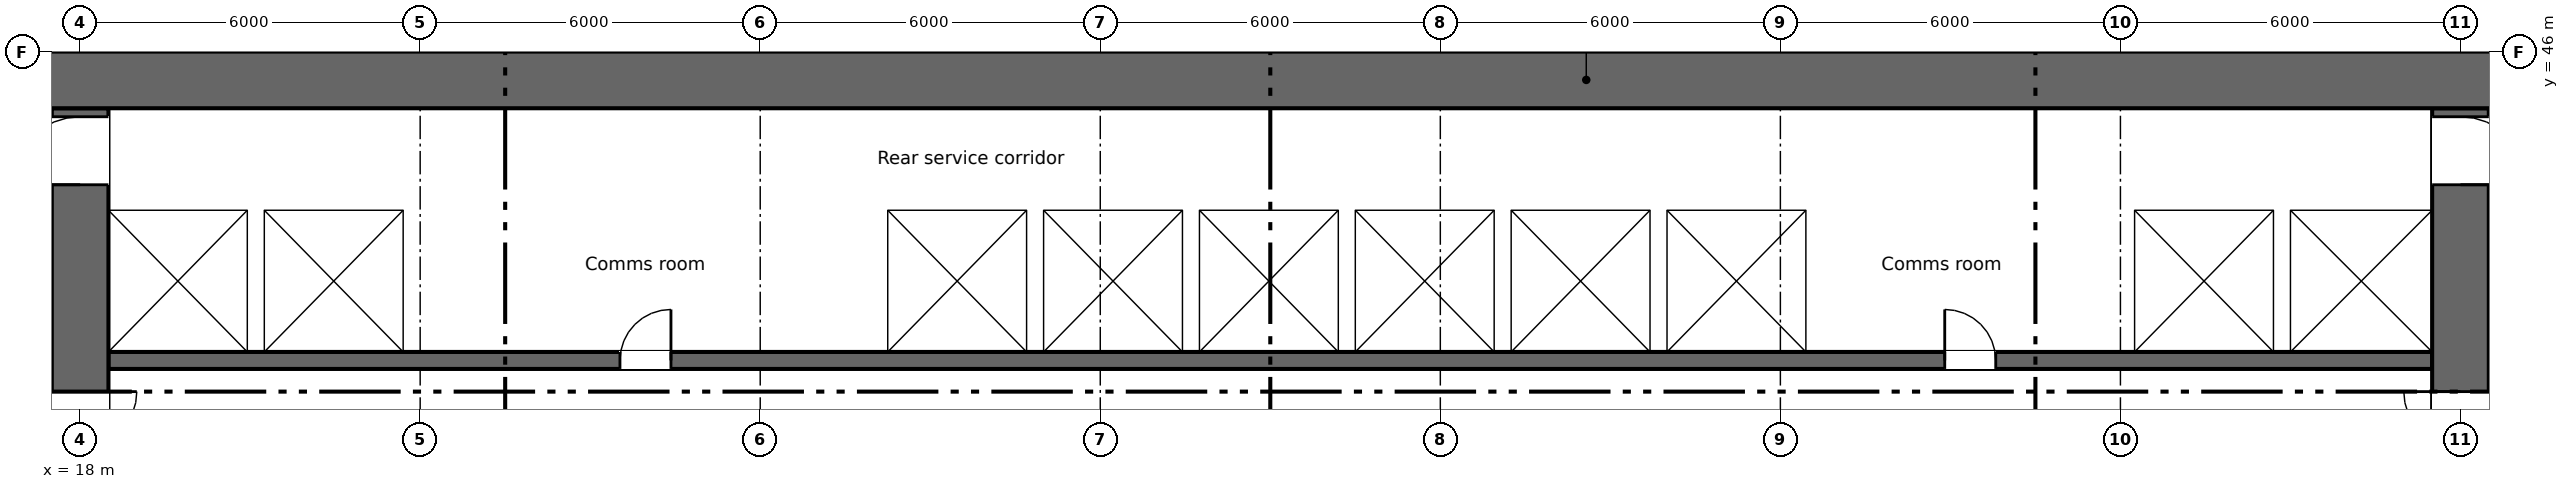
"""IFC4 building model, lengths in metres.
Left out: names, types, materials, properties, quantities, classifications, styles, units other than length and angle.
Written with IfcOpenShell. Run it as: python <this file> out.ifc"""

import sys

from ifc_helpers import new_model, si_unit, direction, frame, frame_2d, origin, place, context, subcontext, project, spatial, rectangle, extrude, element, fill, save


model = new_model("IFC4")
c1 = context("Model", 3, precision=1e-05, world=origin(), true_north=direction((0.0, 1.0)))
c2 = subcontext(c1, "Body", "Model", "MODEL_VIEW")
j1 = project(units=[si_unit("LENGTHUNIT", "METRE"), si_unit("PLANEANGLEUNIT", "RADIAN")], contexts=[c1])
p1 = place(None, origin())
s1 = spatial("IfcSite", under=j1, at=p1, CompositionType="ELEMENT")
p2 = place(p1, origin())
s2 = spatial("IfcBuilding", under=s1, at=p2, CompositionType="ELEMENT")
p3 = place(p2, frame((0.0, 0.0, 75.0)))
s3 = spatial("IfcBuildingStorey", under=s2, at=p3, CompositionType="ELEMENT", Elevation=75.0)
p4 = place(p3, frame((5.55, 45.5, 0.0), z_axis=(0.0, 0.0, 1.0), x_axis=(1.0, 0.0, 0.0)))
e1 = element("IfcWall", 1, at=p4, inside=s3, PredefinedType="SHEAR", context=c2, shape_type="SweptSolid", body=[
    extrude(rectangle(XDim=66.9, YDim=1.0, at=frame_2d((33.45, 0.0))), origin(), (0.0, 0.0, 1.0), 3.35),
])
p5 = place(p4, frame((7.2, 0.0, 0.6)))
e2 = element("IfcOpeningElement", 2, at=p5, cuts=e1, PredefinedType="OPENING", context=c2, shape_type="SweptSolid", body=[
    extrude(rectangle(XDim=0.6, YDim=2.4, at=frame_2d((0.3, 1.2))), frame((0.0, 0.51, 0.0), z_axis=(0.0, -1.0, 0.0), x_axis=(1.0, 0.0, 0.0)), (0.0, 0.0, 1.0), 1.02),
])
p6 = place(p4, frame((61.2, 0.0, 0.6)))
e3 = element("IfcOpeningElement", 3, at=p6, cuts=e1, PredefinedType="OPENING", context=c2, shape_type="SweptSolid", body=[
    extrude(rectangle(XDim=0.6, YDim=2.4, at=frame_2d((0.3, 1.2))), frame((0.0, 0.51, 0.0), z_axis=(0.0, -1.0, 0.0), x_axis=(1.0, 0.0, 0.0)), (0.0, 0.0, 1.0), 1.02),
])
p7 = place(p3, frame((18.0, 28.4, 0.0), z_axis=(0.0, 0.0, 1.0), x_axis=(0.0, 1.0, 0.0)))
e4 = element("IfcWall", 4, at=p7, inside=s3, PredefinedType="SHEAR", context=c2, shape_type="SweptSolid", body=[
    extrude(rectangle(XDim=16.6, YDim=1.0, at=frame_2d((8.3, 0.0))), origin(), (0.0, 0.0, 1.0), 3.35),
])
p8 = place(p7, frame((9.6, 0.0, 0.0)))
e5 = element("IfcOpeningElement", 5, at=p8, cuts=e4, PredefinedType="OPENING", context=c2, shape_type="SweptSolid", body=[
    extrude(rectangle(XDim=2.0, YDim=2.1, at=frame_2d((1.0, 1.05))), frame((0.0, 0.51, 0.0), z_axis=(0.0, -1.0, 0.0), x_axis=(1.0, 0.0, 0.0)), (0.0, 0.0, 1.0), 1.02),
])
p9 = place(p7, frame((15.25, 0.0, 0.0)))
e6 = element("IfcOpeningElement", 6, at=p9, cuts=e4, PredefinedType="OPENING", context=c2, shape_type="SweptSolid", body=[
    extrude(rectangle(XDim=1.2, YDim=2.1, at=frame_2d((0.6, 1.05))), frame((0.0, 0.51, 0.0), z_axis=(0.0, -1.0, 0.0), x_axis=(1.0, 0.0, 0.0)), (0.0, 0.0, 1.0), 1.02),
])
p10 = place(p3, frame((60.0, 28.4, 0.0), z_axis=(0.0, 0.0, 1.0), x_axis=(0.0, 1.0, 0.0)))
e7 = element("IfcWall", 7, at=p10, inside=s3, PredefinedType="SHEAR", context=c2, shape_type="SweptSolid", body=[
    extrude(rectangle(XDim=16.6, YDim=1.0, at=frame_2d((8.3, 0.0))), origin(), (0.0, 0.0, 1.0), 3.35),
])
p11 = place(p10, frame((9.6, 0.0, 0.0)))
e8 = element("IfcOpeningElement", 8, at=p11, cuts=e7, PredefinedType="OPENING", context=c2, shape_type="SweptSolid", body=[
    extrude(rectangle(XDim=2.0, YDim=2.1, at=frame_2d((1.0, 1.05))), frame((0.0, 0.51, 0.0), z_axis=(0.0, -1.0, 0.0), x_axis=(1.0, 0.0, 0.0)), (0.0, 0.0, 1.0), 1.02),
])
p12 = place(p10, frame((15.25, 0.0, 0.0)))
e9 = element("IfcOpeningElement", 9, at=p12, cuts=e7, PredefinedType="OPENING", context=c2, shape_type="SweptSolid", body=[
    extrude(rectangle(XDim=1.2, YDim=2.1, at=frame_2d((0.6, 1.05))), frame((0.0, 0.51, 0.0), z_axis=(0.0, -1.0, 0.0), x_axis=(1.0, 0.0, 0.0)), (0.0, 0.0, 1.0), 1.02),
])
p13 = place(p3, frame((18.5, 40.55, 0.0), z_axis=(0.0, 0.0, 1.0), x_axis=(1.0, 0.0, 0.0)))
e10 = element("IfcWall", 10, at=p13, inside=s3, PredefinedType="SHEAR", context=c2, shape_type="SweptSolid", body=[
    extrude(rectangle(XDim=41.0, YDim=0.3, at=frame_2d((20.5, 0.0))), origin(), (0.0, 0.0, 1.0), 3.35),
])
p14 = place(p13, frame((9.025, 0.0, 0.0)))
e11 = element("IfcOpeningElement", 11, at=p14, cuts=e10, PredefinedType="OPENING", context=c2, shape_type="SweptSolid", body=[
    extrude(rectangle(XDim=0.9, YDim=2.1, at=frame_2d((0.45, 1.05))), frame((0.0, 0.16, 0.0), z_axis=(0.0, -1.0, 0.0), x_axis=(1.0, 0.0, 0.0)), (0.0, 0.0, 1.0), 0.32),
])
p15 = place(p13, frame((32.4, 0.0, 0.0)))
e12 = element("IfcOpeningElement", 12, at=p15, cuts=e10, PredefinedType="OPENING", context=c2, shape_type="SweptSolid", body=[
    extrude(rectangle(XDim=0.9, YDim=2.1, at=frame_2d((0.45, 1.05))), frame((0.0, 0.16, 0.0), z_axis=(0.0, -1.0, 0.0), x_axis=(1.0, 0.0, 0.0)), (0.0, 0.0, 1.0), 0.32),
])
p16 = place(p13, frame((14.425, 0.0, 0.0)))
e13 = element("IfcOpeningElement", 13, at=p16, cuts=e10, PredefinedType="OPENING", context=c2, shape_type="SweptSolid", body=[
    extrude(rectangle(XDim=1.1, YDim=2.1, at=frame_2d((0.55, 1.05))), frame((0.0, 0.16, 0.0), z_axis=(0.0, -1.0, 0.0), x_axis=(1.0, 0.0, 0.0)), (0.0, 0.0, 1.0), 0.32),
])
p17 = place(p13, frame((17.175, 0.0, 0.0)))
e14 = element("IfcOpeningElement", 14, at=p17, cuts=e10, PredefinedType="OPENING", context=c2, shape_type="SweptSolid", body=[
    extrude(rectangle(XDim=1.1, YDim=2.1, at=frame_2d((0.55, 1.05))), frame((0.0, 0.16, 0.0), z_axis=(0.0, -1.0, 0.0), x_axis=(1.0, 0.0, 0.0)), (0.0, 0.0, 1.0), 0.32),
])
p18 = place(p13, frame((19.925, 0.0, 0.0)))
e15 = element("IfcOpeningElement", 15, at=p18, cuts=e10, PredefinedType="OPENING", context=c2, shape_type="SweptSolid", body=[
    extrude(rectangle(XDim=1.1, YDim=2.1, at=frame_2d((0.55, 1.05))), frame((0.0, 0.16, 0.0), z_axis=(0.0, -1.0, 0.0), x_axis=(1.0, 0.0, 0.0)), (0.0, 0.0, 1.0), 0.32),
])
p19 = place(p13, frame((22.675, 0.0, 0.0)))
e16 = element("IfcOpeningElement", 16, at=p19, cuts=e10, PredefinedType="OPENING", context=c2, shape_type="SweptSolid", body=[
    extrude(rectangle(XDim=1.1, YDim=2.1, at=frame_2d((0.55, 1.05))), frame((0.0, 0.16, 0.0), z_axis=(0.0, -1.0, 0.0), x_axis=(1.0, 0.0, 0.0)), (0.0, 0.0, 1.0), 0.32),
])
p20 = place(p13, frame((36.375, 0.0, 0.0)))
e17 = element("IfcOpeningElement", 17, at=p20, cuts=e10, PredefinedType="OPENING", context=c2, shape_type="SweptSolid", body=[
    extrude(rectangle(XDim=1.2, YDim=2.1, at=frame_2d((0.6, 1.05))), frame((0.0, 0.16, 0.0), z_axis=(0.0, -1.0, 0.0), x_axis=(1.0, 0.0, 0.0)), (0.0, 0.0, 1.0), 0.32),
])
p21 = place(p13, frame((39.15, 0.0, 0.0)))
e18 = element("IfcOpeningElement", 18, at=p21, cuts=e10, PredefinedType="OPENING", context=c2, shape_type="SweptSolid", body=[
    extrude(rectangle(XDim=1.2, YDim=2.1, at=frame_2d((0.6, 1.05))), frame((0.0, 0.16, 0.0), z_axis=(0.0, -1.0, 0.0), x_axis=(1.0, 0.0, 0.0)), (0.0, 0.0, 1.0), 0.32),
])
p22 = place(p3, frame((18.5, 43.35, 0.0), z_axis=(0.0, 0.0, 1.0), x_axis=(1.0, 0.0, 0.0)))
e19 = element("IfcWall", 19, at=p22, inside=s3, PredefinedType="SHEAR", context=c2, shape_type="SweptSolid", body=[
    extrude(rectangle(XDim=41.0, YDim=0.3, at=frame_2d((20.5, 0.0))), origin(), (0.0, 0.0, 1.0), 3.35),
])
for number, where, z_axis, x_axis in (
    (20, (21.1, 40.7, 0.0), (0.0, 0.0, 1.0), (0.0, 1.0, 0.0)),
    (21, (23.85, 40.7, 0.0), (0.0, 0.0, 1.0), (0.0, 1.0, 0.0)),
    (22, (32.1, 40.7, 0.0), (0.0, 0.0, 1.0), (0.0, 1.0, 0.0)),
    (23, (34.85, 40.7, 0.0), (0.0, 0.0, 1.0), (0.0, 1.0, 0.0)),
    (24, (37.6, 40.7, 0.0), (0.0, 0.0, 1.0), (0.0, 1.0, 0.0)),
    (25, (40.35, 40.7, 0.0), (0.0, 0.0, 1.0), (0.0, 1.0, 0.0)),
    (26, (43.1, 40.7, 0.0), (0.0, 0.0, 1.0), (0.0, 1.0, 0.0)),
    (27, (45.85, 40.7, 0.0), (0.0, 0.0, 1.0), (0.0, 1.0, 0.0)),
    (28, (48.6, 40.7, 0.0), (0.0, 0.0, 1.0), (0.0, 1.0, 0.0)),
    (29, (54.1, 40.7, 0.0), (0.0, 0.0, 1.0), (0.0, 1.0, 0.0)),
    (30, (56.85, 40.7, 0.0), (0.0, 0.0, 1.0), (0.0, 1.0, 0.0)),
):
    element("IfcWall", number, at=place(p3, frame(where, z_axis=z_axis, x_axis=x_axis)), inside=s3, PredefinedType="SHEAR", context=c2, shape_type="SweptSolid", body=[
        extrude(rectangle(XDim=2.5, YDim=0.3, at=frame_2d((1.25, 0.0))), origin(), (0.0, 0.0, 1.0), 3.35),
    ])
p23 = place(p14, origin())
e31 = element("IfcDoor", 31, at=p23, inside=s3, OperationType="SINGLE_SWING_RIGHT", PredefinedType="DOOR", context=c2, shape_type="SweptSolid", body=[
    extrude(rectangle(XDim=0.9, YDim=2.1, at=frame_2d((0.45, 1.05))), frame((0.0, 0.025, 0.0), z_axis=(0.0, -1.0, 0.0), x_axis=(1.0, 0.0, 0.0)), (0.0, 0.0, 1.0), 0.05),
])
fill(e11, e31)
p24 = place(p15, origin())
e32 = element("IfcDoor", 32, at=p24, inside=s3, OperationType="SINGLE_SWING_LEFT", PredefinedType="DOOR", context=c2, shape_type="SweptSolid", body=[
    extrude(rectangle(XDim=0.9, YDim=2.1, at=frame_2d((0.45, 1.05))), frame((0.0, 0.025, 0.0), z_axis=(0.0, -1.0, 0.0), x_axis=(1.0, 0.0, 0.0)), (0.0, 0.0, 1.0), 0.05),
])
fill(e12, e32)
p25 = place(p16, origin())
e33 = element("IfcDoor", 33, at=p25, inside=s3, OperationType="SLIDING_TO_LEFT", PredefinedType="DOOR", context=c2, shape_type="SweptSolid", body=[
    extrude(rectangle(XDim=1.1, YDim=2.1, at=frame_2d((0.55, 1.05))), frame((0.0, 0.025, 0.0), z_axis=(0.0, -1.0, 0.0), x_axis=(1.0, 0.0, 0.0)), (0.0, 0.0, 1.0), 0.05),
])
fill(e13, e33)
p26 = place(p17, origin())
e34 = element("IfcDoor", 34, at=p26, inside=s3, OperationType="SLIDING_TO_LEFT", PredefinedType="DOOR", context=c2, shape_type="SweptSolid", body=[
    extrude(rectangle(XDim=1.1, YDim=2.1, at=frame_2d((0.55, 1.05))), frame((0.0, 0.025, 0.0), z_axis=(0.0, -1.0, 0.0), x_axis=(1.0, 0.0, 0.0)), (0.0, 0.0, 1.0), 0.05),
])
fill(e14, e34)
p27 = place(p18, origin())
e35 = element("IfcDoor", 35, at=p27, inside=s3, OperationType="SLIDING_TO_LEFT", PredefinedType="DOOR", context=c2, shape_type="SweptSolid", body=[
    extrude(rectangle(XDim=1.1, YDim=2.1, at=frame_2d((0.55, 1.05))), frame((0.0, 0.025, 0.0), z_axis=(0.0, -1.0, 0.0), x_axis=(1.0, 0.0, 0.0)), (0.0, 0.0, 1.0), 0.05),
])
fill(e15, e35)
p28 = place(p19, origin())
e36 = element("IfcDoor", 36, at=p28, inside=s3, OperationType="SLIDING_TO_LEFT", PredefinedType="DOOR", context=c2, shape_type="SweptSolid", body=[
    extrude(rectangle(XDim=1.1, YDim=2.1, at=frame_2d((0.55, 1.05))), frame((0.0, 0.025, 0.0), z_axis=(0.0, -1.0, 0.0), x_axis=(1.0, 0.0, 0.0)), (0.0, 0.0, 1.0), 0.05),
])
fill(e16, e36)
p29 = place(p20, origin())
e37 = element("IfcDoor", 37, at=p29, inside=s3, OperationType="SLIDING_TO_LEFT", PredefinedType="DOOR", context=c2, shape_type="SweptSolid", body=[
    extrude(rectangle(XDim=1.2, YDim=2.1, at=frame_2d((0.6, 1.05))), frame((0.0, 0.025, 0.0), z_axis=(0.0, -1.0, 0.0), x_axis=(1.0, 0.0, 0.0)), (0.0, 0.0, 1.0), 0.05),
])
fill(e17, e37)
p30 = place(p21, origin())
e38 = element("IfcDoor", 38, at=p30, inside=s3, OperationType="SLIDING_TO_LEFT", PredefinedType="DOOR", context=c2, shape_type="SweptSolid", body=[
    extrude(rectangle(XDim=1.2, YDim=2.1, at=frame_2d((0.6, 1.05))), frame((0.0, 0.025, 0.0), z_axis=(0.0, -1.0, 0.0), x_axis=(1.0, 0.0, 0.0)), (0.0, 0.0, 1.0), 0.05),
])
fill(e18, e38)
p31 = place(p8, origin())
e39 = element("IfcDoor", 39, at=p31, inside=s3, OperationType="DOUBLE_DOOR_SINGLE_SWING", PredefinedType="DOOR", context=c2, shape_type="SweptSolid", body=[
    extrude(rectangle(XDim=2.0, YDim=2.1, at=frame_2d((1.0, 1.05))), frame((0.0, 0.025, 0.0), z_axis=(0.0, -1.0, 0.0), x_axis=(1.0, 0.0, 0.0)), (0.0, 0.0, 1.0), 0.05),
])
fill(e5, e39)
p32 = place(p11, origin())
e40 = element("IfcDoor", 40, at=p32, inside=s3, OperationType="DOUBLE_DOOR_SINGLE_SWING", PredefinedType="DOOR", context=c2, shape_type="SweptSolid", body=[
    extrude(rectangle(XDim=2.0, YDim=2.1, at=frame_2d((1.0, 1.05))), frame((0.0, 0.025, 0.0), z_axis=(0.0, -1.0, 0.0), x_axis=(1.0, 0.0, 0.0)), (0.0, 0.0, 1.0), 0.05),
])
fill(e8, e40)
p33 = place(p9, origin())
e41 = element("IfcDoor", 41, at=p33, inside=s3, OperationType="SINGLE_SWING_LEFT", PredefinedType="DOOR", context=c2, shape_type="SweptSolid", body=[
    extrude(rectangle(XDim=1.2, YDim=2.1, at=frame_2d((0.6, 1.05))), frame((0.0, 0.025, 0.0), z_axis=(0.0, -1.0, 0.0), x_axis=(1.0, 0.0, 0.0)), (0.0, 0.0, 1.0), 0.05),
])
fill(e6, e41)
p34 = place(p12, origin())
e42 = element("IfcDoor", 42, at=p34, inside=s3, OperationType="SINGLE_SWING_LEFT", PredefinedType="DOOR", context=c2, shape_type="SweptSolid", body=[
    extrude(rectangle(XDim=1.2, YDim=2.1, at=frame_2d((0.6, 1.05))), frame((0.0, 0.025, 0.0), z_axis=(0.0, -1.0, 0.0), x_axis=(1.0, 0.0, 0.0)), (0.0, 0.0, 1.0), 0.05),
])
fill(e9, e42)
save(model, sys.argv[1])
